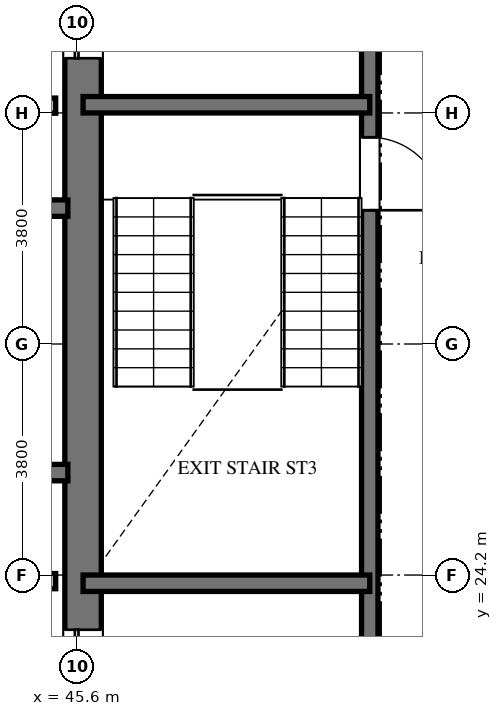
"""IFC4 building model, lengths in metres.
Left out: names, types, materials, properties, quantities, classifications, styles, units other than length and angle.
Written with IfcOpenShell. Run it as: python <this file> out.ifc"""

import sys

from ifc_helpers import new_model, si_unit, direction, frame, frame_2d, origin, place, context, subcontext, project, spatial, rectangle, extrude, element, fill, save


model = new_model("IFC4")
c1 = context("Model", 3, precision=1e-05, world=origin(), true_north=direction((0.0, 1.0)))
c2 = subcontext(c1, "Body", "Model", "MODEL_VIEW")
j1 = project(units=[si_unit("LENGTHUNIT", "METRE"), si_unit("PLANEANGLEUNIT", "RADIAN")], contexts=[c1])
p1 = place(None, origin())
s1 = spatial("IfcSite", under=j1, at=p1, CompositionType="ELEMENT")
p2 = place(p1, origin())
s2 = spatial("IfcBuilding", under=s1, at=p2, CompositionType="ELEMENT")
p3 = place(p2, frame((0.0, 0.0, 174.768)))
s3 = spatial("IfcBuildingStorey", under=s2, at=p3, CompositionType="ELEMENT", Elevation=174.768)
p4 = place(p3, frame((45.7, 20.95, 0.0), z_axis=(0.0, 0.0, 1.0), x_axis=(0.0, 1.0, 0.0)))
e1 = element("IfcWall", 1, at=p4, inside=s3, PredefinedType="SHEAR", context=c2, shape_type="SweptSolid", body=[
    extrude(rectangle(XDim=14.1, YDim=0.6, at=frame_2d((7.05, 0.0))), origin(), (0.0, 0.0, 1.0), 3.648),
])
p5 = place(p4, frame((11.75, 0.0, 0.0)))
e2 = element("IfcOpeningElement", 2, at=p5, cuts=e1, PredefinedType="OPENING", context=c2, shape_type="SweptSolid", body=[
    extrude(rectangle(XDim=1.4, YDim=2.3, at=frame_2d((0.7, 1.15))), frame((0.0, 0.31, 0.0), z_axis=(0.0, -1.0, 0.0), x_axis=(1.0, 0.0, 0.0)), (0.0, 0.0, 1.0), 0.62),
])
p6 = place(p4, frame((0.95, 0.0, 0.0)))
e3 = element("IfcOpeningElement", 3, at=p6, cuts=e1, PredefinedType="OPENING", context=c2, shape_type="SweptSolid", body=[
    extrude(rectangle(XDim=1.4, YDim=2.3, at=frame_2d((0.7, 1.15))), frame((0.0, 0.31, 0.0), z_axis=(0.0, -1.0, 0.0), x_axis=(1.0, 0.0, 0.0)), (0.0, 0.0, 1.0), 0.62),
])
p7 = place(p3, frame((37.465, 30.235, 0.0), z_axis=(0.0, 0.0, 1.0), x_axis=(1.0, 0.0, 0.0)))
e4 = element("IfcWall", 4, at=p7, inside=s3, PredefinedType="SHEAR", context=c2, shape_type="SweptSolid", body=[
    extrude(rectangle(XDim=7.985, YDim=0.27, at=frame_2d((3.992, 0.0))), origin(), (0.0, 0.0, 1.0), 3.648),
])
p8 = place(p7, frame((6.455, 0.0, 0.0)))
e5 = element("IfcOpeningElement", 5, at=p8, cuts=e4, PredefinedType="OPENING", context=c2, shape_type="SweptSolid", body=[
    extrude(rectangle(XDim=1.2, YDim=2.15, at=frame_2d((0.6, 1.075))), frame((0.0, 0.145, 0.0), z_axis=(0.0, -1.0, 0.0), x_axis=(1.0, 0.0, 0.0)), (0.0, 0.0, 1.0), 0.29),
])
p9 = place(p3, frame((37.465, 25.885, 0.0), z_axis=(0.0, 0.0, 1.0), x_axis=(1.0, 0.0, 0.0)))
e6 = element("IfcWall", 6, at=p9, inside=s3, PredefinedType="SHEAR", context=c2, shape_type="SweptSolid", body=[
    extrude(rectangle(XDim=7.985, YDim=0.27, at=frame_2d((3.992, 0.0))), origin(), (0.0, 0.0, 1.0), 3.648),
])
for number, where, z_axis, x_axis in (
    (7, (42.95, 31.92, 0.0), (0.0, 0.0, 1.0), (1.0, 0.0, 0.0)),
    (8, (42.95, 24.1, 0.0), (0.0, 0.0, 1.0), (1.0, 0.0, 0.0)),
):
    element("IfcWall", number, at=place(p3, frame(where, z_axis=z_axis, x_axis=x_axis)), inside=s3, PredefinedType="SOLIDWALL", context=c2, shape_type="SweptSolid", body=[
        extrude(rectangle(XDim=2.3, YDim=0.25, at=frame_2d((1.15, 0.0))), origin(), (0.0, 0.0, 1.0), 3.428),
    ])
p10 = place(p3, frame((50.415, 35.845, 0.0), z_axis=(0.0, 0.0, 1.0), x_axis=(0.0, -1.0, 0.0)))
e9 = element("IfcWall", 9, at=p10, inside=s3, PredefinedType="SHEAR", context=c2, shape_type="SweptSolid", body=[
    extrude(rectangle(XDim=15.825, YDim=0.27, at=frame_2d((7.913, 0.0))), origin(), (0.0, 0.0, 1.0), 3.648),
])
p11 = place(p10, frame((4.445, 0.0, 0.0)))
e10 = element("IfcOpeningElement", 10, at=p11, cuts=e9, PredefinedType="OPENING", context=c2, shape_type="SweptSolid", body=[
    extrude(rectangle(XDim=1.2, YDim=2.15, at=frame_2d((0.6, 1.075))), frame((0.0, 0.145, 0.0), z_axis=(0.0, -1.0, 0.0), x_axis=(1.0, 0.0, 0.0)), (0.0, 0.0, 1.0), 0.29),
])
p12 = place(p10, frame((1.295, 0.0, 0.0)))
e11 = element("IfcOpeningElement", 11, at=p12, cuts=e9, PredefinedType="OPENING", context=c2, shape_type="SweptSolid", body=[
    extrude(rectangle(XDim=1.3, YDim=2.2, at=frame_2d((0.65, 1.1))), frame((0.0, 0.145, 0.0), z_axis=(0.0, -1.0, 0.0), x_axis=(1.0, 0.0, 0.0)), (0.0, 0.0, 1.0), 0.29),
])
p13 = place(p10, frame((13.095, 0.0, 0.0)))
e12 = element("IfcOpeningElement", 12, at=p13, cuts=e9, PredefinedType="OPENING", context=c2, shape_type="SweptSolid", body=[
    extrude(rectangle(XDim=1.3, YDim=2.2, at=frame_2d((0.65, 1.1))), frame((0.0, 0.145, 0.0), z_axis=(0.0, -1.0, 0.0), x_axis=(1.0, 0.0, 0.0)), (0.0, 0.0, 1.0), 0.29),
])
for number, where, z_axis, x_axis in (
    (13, (45.7, 31.935, 0.0), (0.0, 0.0, 1.0), (1.0, 0.0, 0.0)),
    (14, (45.7, 24.065, 0.0), (0.0, 0.0, 1.0), (1.0, 0.0, 0.0)),
):
    element("IfcWall", number, at=place(p3, frame(where, z_axis=z_axis, x_axis=x_axis)), inside=s3, PredefinedType="SHEAR", context=c2, shape_type="SweptSolid", body=[
        extrude(rectangle(XDim=4.715, YDim=0.27, at=frame_2d((2.357, 0.0))), origin(), (0.0, 0.0, 1.0), 3.648),
    ])
p14 = place(p5, origin())
e15 = element("IfcDoor", 15, at=p14, inside=s3, OperationType="SLIDING_TO_LEFT", PredefinedType="DOOR", context=c2, shape_type="SweptSolid", body=[
    extrude(rectangle(XDim=1.4, YDim=2.3, at=frame_2d((0.7, 1.15))), frame((0.0, 0.025, 0.0), z_axis=(0.0, -1.0, 0.0), x_axis=(1.0, 0.0, 0.0)), (0.0, 0.0, 1.0), 0.05),
])
fill(e2, e15)
p15 = place(p6, origin())
e16 = element("IfcDoor", 16, at=p15, inside=s3, OperationType="SLIDING_TO_LEFT", PredefinedType="DOOR", context=c2, shape_type="SweptSolid", body=[
    extrude(rectangle(XDim=1.4, YDim=2.3, at=frame_2d((0.7, 1.15))), frame((0.0, 0.025, 0.0), z_axis=(0.0, -1.0, 0.0), x_axis=(1.0, 0.0, 0.0)), (0.0, 0.0, 1.0), 0.05),
])
fill(e3, e16)
p16 = place(p11, origin())
e17 = element("IfcDoor", 17, at=p16, inside=s3, OperationType="SINGLE_SWING_RIGHT", PredefinedType="DOOR", context=c2, shape_type="SweptSolid", body=[
    extrude(rectangle(XDim=1.2, YDim=2.15, at=frame_2d((0.6, 1.075))), frame((0.0, 0.025, 0.0), z_axis=(0.0, -1.0, 0.0), x_axis=(1.0, 0.0, 0.0)), (0.0, 0.0, 1.0), 0.05),
])
fill(e10, e17)
save(model, sys.argv[1])
